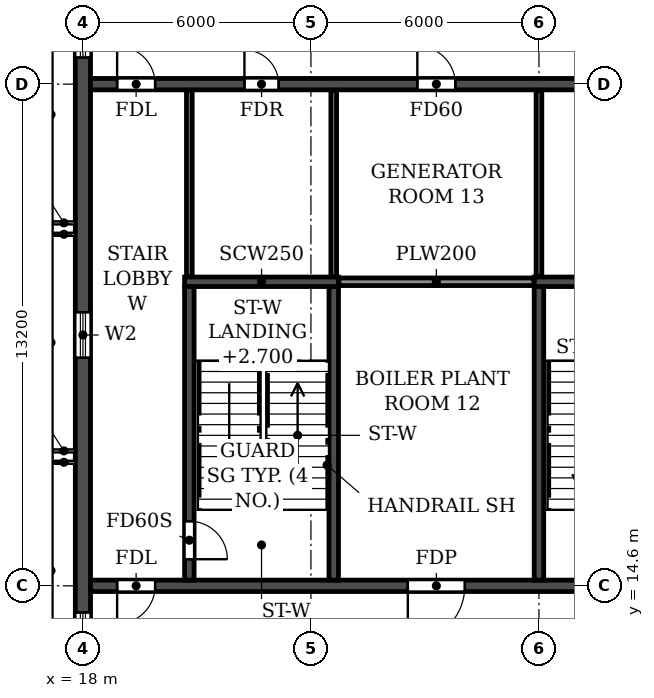
"""IFC4 building model, lengths in metres.
Left out: names, types, materials, properties, quantities, classifications, styles, units other than length and angle.
Written with IfcOpenShell. Run it as: python <this file> out.ifc"""

import sys

from ifc_helpers import new_model, si_unit, direction, frame, frame_2d, origin, place, context, subcontext, project, spatial, rectangle, extrude, element, fill, save


model = new_model("IFC4")
c1 = context("Model", 3, precision=1e-05, world=origin(), true_north=direction((0.0, 1.0)))
c2 = subcontext(c1, "Body", "Model", "MODEL_VIEW")
j1 = project(units=[si_unit("LENGTHUNIT", "METRE"), si_unit("PLANEANGLEUNIT", "RADIAN")], contexts=[c1])
p1 = place(None, origin())
s1 = spatial("IfcSite", under=j1, at=p1, CompositionType="ELEMENT")
p2 = place(p1, origin())
s2 = spatial("IfcBuilding", under=s1, at=p2, CompositionType="ELEMENT")
p3 = place(p2, frame((0.0, 0.0, 267.0)))
s3 = spatial("IfcBuildingStorey", under=s2, at=p3, CompositionType="ELEMENT", Elevation=267.0)
p4 = place(p3, frame((18.0, 4.683, 0.0), z_axis=(0.0, 0.0, 1.0), x_axis=(0.0, 1.0, 0.0)))
e1 = element("IfcWall", 1, at=p4, inside=s3, PredefinedType="SHEAR", context=c2, shape_type="SweptSolid", body=[
    extrude(rectangle(XDim=31.834, YDim=0.4, at=frame_2d((15.917, 0.0))), origin(), (0.0, 0.0, 1.0), 5.15),
])
p5 = place(p4, frame((23.817, 0.0, 0.9)))
e2 = element("IfcOpeningElement", 2, at=p5, cuts=e1, PredefinedType="OPENING", context=c2, shape_type="SweptSolid", body=[
    extrude(rectangle(XDim=1.2, YDim=1.5, at=frame_2d((0.6, 0.75))), frame((0.0, 0.21, 0.0), z_axis=(0.0, -1.0, 0.0), x_axis=(1.0, 0.0, 0.0)), (0.0, 0.0, 1.0), 0.42),
])
p6 = place(p4, frame((8.017, 0.0, 0.9)))
e3 = element("IfcOpeningElement", 3, at=p6, cuts=e1, PredefinedType="OPENING", context=c2, shape_type="SweptSolid", body=[
    extrude(rectangle(XDim=1.2, YDim=1.5, at=frame_2d((0.6, 0.75))), frame((0.0, 0.21, 0.0), z_axis=(0.0, -1.0, 0.0), x_axis=(1.0, 0.0, 0.0)), (0.0, 0.0, 1.0), 0.42),
])
p7 = place(p4, frame((15.917, 0.0, 0.9)))
e4 = element("IfcOpeningElement", 4, at=p7, cuts=e1, PredefinedType="OPENING", context=c2, shape_type="SweptSolid", body=[
    extrude(rectangle(XDim=1.2, YDim=1.5, at=frame_2d((0.6, 0.75))), frame((0.0, 0.21, 0.0), z_axis=(0.0, -1.0, 0.0), x_axis=(1.0, 0.0, 0.0)), (0.0, 0.0, 1.0), 0.42),
])
p8 = place(p3, frame((18.2, 14.6, 0.0), z_axis=(0.0, 0.0, 1.0), x_axis=(1.0, 0.0, 0.0)))
e5 = element("IfcWall", 5, at=p8, inside=s3, PredefinedType="SOLIDWALL", context=c2, shape_type="SweptSolid", body=[
    extrude(rectangle(XDim=65.6, YDim=0.3, at=frame_2d((32.8, 0.0))), origin(), (0.0, 0.0, 1.0), 5.15),
])
p9 = place(p8, frame((0.7, 0.0, 0.0)))
e6 = element("IfcOpeningElement", 6, at=p9, cuts=e5, PredefinedType="OPENING", context=c2, shape_type="SweptSolid", body=[
    extrude(rectangle(XDim=1.0, YDim=2.1, at=frame_2d((0.5, 1.05))), frame((0.0, 0.16, 0.0), z_axis=(0.0, -1.0, 0.0), x_axis=(1.0, 0.0, 0.0)), (0.0, 0.0, 1.0), 0.32),
])
p10 = place(p8, frame((8.35, 0.0, 0.0)))
e7 = element("IfcOpeningElement", 7, at=p10, cuts=e5, PredefinedType="OPENING", context=c2, shape_type="SweptSolid", body=[
    extrude(rectangle(XDim=1.5, YDim=2.1, at=frame_2d((0.75, 1.05))), frame((0.0, 0.16, 0.0), z_axis=(0.0, -1.0, 0.0), x_axis=(1.0, 0.0, 0.0)), (0.0, 0.0, 1.0), 0.32),
])
p11 = place(p8, frame((13.2, 0.0, 0.0)))
e8 = element("IfcOpeningElement", 8, at=p11, cuts=e5, PredefinedType="OPENING", context=c2, shape_type="SweptSolid", body=[
    extrude(rectangle(XDim=1.0, YDim=2.1, at=frame_2d((0.5, 1.05))), frame((0.0, 0.16, 0.0), z_axis=(0.0, -1.0, 0.0), x_axis=(1.0, 0.0, 0.0)), (0.0, 0.0, 1.0), 0.32),
])
p12 = place(p8, frame((27.1, 0.0, 0.0)))
e9 = element("IfcOpeningElement", 9, at=p12, cuts=e5, PredefinedType="OPENING", context=c2, shape_type="SweptSolid", body=[
    extrude(rectangle(XDim=1.0, YDim=2.1, at=frame_2d((0.5, 1.05))), frame((0.0, 0.16, 0.0), z_axis=(0.0, -1.0, 0.0), x_axis=(1.0, 0.0, 0.0)), (0.0, 0.0, 1.0), 0.32),
])
p13 = place(p8, frame((32.3, 0.0, 0.0)))
e10 = element("IfcOpeningElement", 10, at=p13, cuts=e5, PredefinedType="OPENING", context=c2, shape_type="SweptSolid", body=[
    extrude(rectangle(XDim=1.0, YDim=2.1, at=frame_2d((0.5, 1.05))), frame((0.0, 0.16, 0.0), z_axis=(0.0, -1.0, 0.0), x_axis=(1.0, 0.0, 0.0)), (0.0, 0.0, 1.0), 0.32),
])
p14 = place(p8, frame((34.9, 0.0, 0.0)))
e11 = element("IfcOpeningElement", 11, at=p14, cuts=e5, PredefinedType="OPENING", context=c2, shape_type="SweptSolid", body=[
    extrude(rectangle(XDim=1.0, YDim=2.1, at=frame_2d((0.5, 1.05))), frame((0.0, 0.16, 0.0), z_axis=(0.0, -1.0, 0.0), x_axis=(1.0, 0.0, 0.0)), (0.0, 0.0, 1.0), 0.32),
])
p15 = place(p8, frame((38.8, 0.0, 0.0)))
e12 = element("IfcOpeningElement", 12, at=p15, cuts=e5, PredefinedType="OPENING", context=c2, shape_type="SweptSolid", body=[
    extrude(rectangle(XDim=1.0, YDim=2.1, at=frame_2d((0.5, 1.05))), frame((0.0, 0.16, 0.0), z_axis=(0.0, -1.0, 0.0), x_axis=(1.0, 0.0, 0.0)), (0.0, 0.0, 1.0), 0.32),
])
p16 = place(p8, frame((51.4, 0.0, 0.0)))
e13 = element("IfcOpeningElement", 13, at=p16, cuts=e5, PredefinedType="OPENING", context=c2, shape_type="SweptSolid", body=[
    extrude(rectangle(XDim=1.0, YDim=2.1, at=frame_2d((0.5, 1.05))), frame((0.0, 0.16, 0.0), z_axis=(0.0, -1.0, 0.0), x_axis=(1.0, 0.0, 0.0)), (0.0, 0.0, 1.0), 0.32),
])
p17 = place(p8, frame((55.75, 0.0, 0.0)))
e14 = element("IfcOpeningElement", 14, at=p17, cuts=e5, PredefinedType="OPENING", context=c2, shape_type="SweptSolid", body=[
    extrude(rectangle(XDim=1.5, YDim=2.1, at=frame_2d((0.75, 1.05))), frame((0.0, 0.16, 0.0), z_axis=(0.0, -1.0, 0.0), x_axis=(1.0, 0.0, 0.0)), (0.0, 0.0, 1.0), 0.32),
])
p18 = place(p8, frame((63.9, 0.0, 0.0)))
e15 = element("IfcOpeningElement", 15, at=p18, cuts=e5, PredefinedType="OPENING", context=c2, shape_type="SweptSolid", body=[
    extrude(rectangle(XDim=1.0, YDim=2.1, at=frame_2d((0.5, 1.05))), frame((0.0, 0.16, 0.0), z_axis=(0.0, -1.0, 0.0), x_axis=(1.0, 0.0, 0.0)), (0.0, 0.0, 1.0), 0.32),
])
p19 = place(p3, frame((18.2, 27.8, 0.0), z_axis=(0.0, 0.0, 1.0), x_axis=(1.0, 0.0, 0.0)))
e16 = element("IfcWall", 16, at=p19, inside=s3, PredefinedType="SOLIDWALL", context=c2, shape_type="SweptSolid", body=[
    extrude(rectangle(XDim=65.6, YDim=0.3, at=frame_2d((32.8, 0.0))), origin(), (0.0, 0.0, 1.0), 5.15),
])
p20 = place(p19, frame((0.7, 0.0, 0.0)))
e17 = element("IfcOpeningElement", 17, at=p20, cuts=e16, PredefinedType="OPENING", context=c2, shape_type="SweptSolid", body=[
    extrude(rectangle(XDim=1.0, YDim=2.1, at=frame_2d((0.5, 1.05))), frame((0.0, 0.16, 0.0), z_axis=(0.0, -1.0, 0.0), x_axis=(1.0, 0.0, 0.0)), (0.0, 0.0, 1.0), 0.32),
])
p21 = place(p19, frame((4.05, 0.0, 0.0)))
e18 = element("IfcOpeningElement", 18, at=p21, cuts=e16, PredefinedType="OPENING", context=c2, shape_type="SweptSolid", body=[
    extrude(rectangle(XDim=0.9, YDim=2.1, at=frame_2d((0.45, 1.05))), frame((0.0, 0.16, 0.0), z_axis=(0.0, -1.0, 0.0), x_axis=(1.0, 0.0, 0.0)), (0.0, 0.0, 1.0), 0.32),
])
p22 = place(p19, frame((8.6, 0.0, 0.0)))
e19 = element("IfcOpeningElement", 19, at=p22, cuts=e16, PredefinedType="OPENING", context=c2, shape_type="SweptSolid", body=[
    extrude(rectangle(XDim=1.0, YDim=2.1, at=frame_2d((0.5, 1.05))), frame((0.0, 0.16, 0.0), z_axis=(0.0, -1.0, 0.0), x_axis=(1.0, 0.0, 0.0)), (0.0, 0.0, 1.0), 0.32),
])
p23 = place(p19, frame((13.25, 0.0, 0.0)))
e20 = element("IfcOpeningElement", 20, at=p23, cuts=e16, PredefinedType="OPENING", context=c2, shape_type="SweptSolid", body=[
    extrude(rectangle(XDim=0.9, YDim=2.1, at=frame_2d((0.45, 1.05))), frame((0.0, 0.16, 0.0), z_axis=(0.0, -1.0, 0.0), x_axis=(1.0, 0.0, 0.0)), (0.0, 0.0, 1.0), 0.32),
])
p24 = place(p19, frame((17.7, 0.0, 0.0)))
e21 = element("IfcOpeningElement", 21, at=p24, cuts=e16, PredefinedType="OPENING", context=c2, shape_type="SweptSolid", body=[
    extrude(rectangle(XDim=1.0, YDim=2.1, at=frame_2d((0.5, 1.05))), frame((0.0, 0.16, 0.0), z_axis=(0.0, -1.0, 0.0), x_axis=(1.0, 0.0, 0.0)), (0.0, 0.0, 1.0), 0.32),
])
p25 = place(p19, frame((22.9, 0.0, 0.0)))
e22 = element("IfcOpeningElement", 22, at=p25, cuts=e16, PredefinedType="OPENING", context=c2, shape_type="SweptSolid", body=[
    extrude(rectangle(XDim=1.0, YDim=2.1, at=frame_2d((0.5, 1.05))), frame((0.0, 0.16, 0.0), z_axis=(0.0, -1.0, 0.0), x_axis=(1.0, 0.0, 0.0)), (0.0, 0.0, 1.0), 0.32),
])
p26 = place(p19, frame((29.4, 0.0, 0.0)))
e23 = element("IfcOpeningElement", 23, at=p26, cuts=e16, PredefinedType="OPENING", context=c2, shape_type="SweptSolid", body=[
    extrude(rectangle(XDim=1.0, YDim=2.1, at=frame_2d((0.5, 1.05))), frame((0.0, 0.16, 0.0), z_axis=(0.0, -1.0, 0.0), x_axis=(1.0, 0.0, 0.0)), (0.0, 0.0, 1.0), 0.32),
])
p27 = place(p19, frame((32.3, 0.0, 0.0)))
e24 = element("IfcOpeningElement", 24, at=p27, cuts=e16, PredefinedType="OPENING", context=c2, shape_type="SweptSolid", body=[
    extrude(rectangle(XDim=1.0, YDim=2.1, at=frame_2d((0.5, 1.05))), frame((0.0, 0.16, 0.0), z_axis=(0.0, -1.0, 0.0), x_axis=(1.0, 0.0, 0.0)), (0.0, 0.0, 1.0), 0.32),
])
p28 = place(p19, frame((35.2, 0.0, 0.0)))
e25 = element("IfcOpeningElement", 25, at=p28, cuts=e16, PredefinedType="OPENING", context=c2, shape_type="SweptSolid", body=[
    extrude(rectangle(XDim=1.0, YDim=2.1, at=frame_2d((0.5, 1.05))), frame((0.0, 0.16, 0.0), z_axis=(0.0, -1.0, 0.0), x_axis=(1.0, 0.0, 0.0)), (0.0, 0.0, 1.0), 0.32),
])
p29 = place(p19, frame((37.8, 0.0, 0.0)))
e26 = element("IfcOpeningElement", 26, at=p29, cuts=e16, PredefinedType="OPENING", context=c2, shape_type="SweptSolid", body=[
    extrude(rectangle(XDim=1.0, YDim=2.1, at=frame_2d((0.5, 1.05))), frame((0.0, 0.16, 0.0), z_axis=(0.0, -1.0, 0.0), x_axis=(1.0, 0.0, 0.0)), (0.0, 0.0, 1.0), 0.32),
])
p30 = place(p19, frame((40.4, 0.0, 0.0)))
e27 = element("IfcOpeningElement", 27, at=p30, cuts=e16, PredefinedType="OPENING", context=c2, shape_type="SweptSolid", body=[
    extrude(rectangle(XDim=1.0, YDim=2.1, at=frame_2d((0.5, 1.05))), frame((0.0, 0.16, 0.0), z_axis=(0.0, -1.0, 0.0), x_axis=(1.0, 0.0, 0.0)), (0.0, 0.0, 1.0), 0.32),
])
p31 = place(p19, frame((43.0, 0.0, 0.0)))
e28 = element("IfcOpeningElement", 28, at=p31, cuts=e16, PredefinedType="OPENING", context=c2, shape_type="SweptSolid", body=[
    extrude(rectangle(XDim=1.0, YDim=2.1, at=frame_2d((0.5, 1.05))), frame((0.0, 0.16, 0.0), z_axis=(0.0, -1.0, 0.0), x_axis=(1.0, 0.0, 0.0)), (0.0, 0.0, 1.0), 0.32),
])
p32 = place(p19, frame((46.9, 0.0, 0.0)))
e29 = element("IfcOpeningElement", 29, at=p32, cuts=e16, PredefinedType="OPENING", context=c2, shape_type="SweptSolid", body=[
    extrude(rectangle(XDim=1.0, YDim=2.1, at=frame_2d((0.5, 1.05))), frame((0.0, 0.16, 0.0), z_axis=(0.0, -1.0, 0.0), x_axis=(1.0, 0.0, 0.0)), (0.0, 0.0, 1.0), 0.32),
])
p33 = place(p19, frame((51.45, 0.0, 0.0)))
e30 = element("IfcOpeningElement", 30, at=p33, cuts=e16, PredefinedType="OPENING", context=c2, shape_type="SweptSolid", body=[
    extrude(rectangle(XDim=0.9, YDim=2.1, at=frame_2d((0.45, 1.05))), frame((0.0, 0.16, 0.0), z_axis=(0.0, -1.0, 0.0), x_axis=(1.0, 0.0, 0.0)), (0.0, 0.0, 1.0), 0.32),
])
p34 = place(p19, frame((56.0, 0.0, 0.0)))
e31 = element("IfcOpeningElement", 31, at=p34, cuts=e16, PredefinedType="OPENING", context=c2, shape_type="SweptSolid", body=[
    extrude(rectangle(XDim=1.0, YDim=2.1, at=frame_2d((0.5, 1.05))), frame((0.0, 0.16, 0.0), z_axis=(0.0, -1.0, 0.0), x_axis=(1.0, 0.0, 0.0)), (0.0, 0.0, 1.0), 0.32),
])
p35 = place(p19, frame((60.65, 0.0, 0.0)))
e32 = element("IfcOpeningElement", 32, at=p35, cuts=e16, PredefinedType="OPENING", context=c2, shape_type="SweptSolid", body=[
    extrude(rectangle(XDim=0.9, YDim=2.1, at=frame_2d((0.45, 1.05))), frame((0.0, 0.16, 0.0), z_axis=(0.0, -1.0, 0.0), x_axis=(1.0, 0.0, 0.0)), (0.0, 0.0, 1.0), 0.32),
])
p36 = place(p19, frame((63.9, 0.0, 0.0)))
e33 = element("IfcOpeningElement", 33, at=p36, cuts=e16, PredefinedType="OPENING", context=c2, shape_type="SweptSolid", body=[
    extrude(rectangle(XDim=1.0, YDim=2.1, at=frame_2d((0.5, 1.05))), frame((0.0, 0.16, 0.0), z_axis=(0.0, -1.0, 0.0), x_axis=(1.0, 0.0, 0.0)), (0.0, 0.0, 1.0), 0.32),
])
p37 = place(p3, frame((30.0, 14.75, 0.0), z_axis=(0.0, 0.0, 1.0), x_axis=(0.0, 1.0, 0.0)))
e34 = element("IfcWall", 34, at=p37, inside=s3, PredefinedType="SOLIDWALL", context=c2, shape_type="SweptSolid", body=[
    extrude(rectangle(XDim=7.725, YDim=0.25, at=frame_2d((3.863, 0.0))), origin(), (0.0, 0.0, 1.0), 5.15),
])
p38 = place(p3, frame((29.875, 22.6, 0.0), z_axis=(0.0, 0.0, 1.0), x_axis=(1.0, 0.0, 0.0)))
e35 = element("IfcWall", 35, at=p38, inside=s3, PredefinedType="SOLIDWALL", context=c2, shape_type="SweptSolid", body=[
    extrude(rectangle(XDim=4.05, YDim=0.25, at=frame_2d((2.025, 0.0))), origin(), (0.0, 0.0, 1.0), 5.15),
])
p39 = place(p3, frame((20.8, 14.75, 0.0), z_axis=(0.0, 0.0, 1.0), x_axis=(0.0, 1.0, 0.0)))
e36 = element("IfcWall", 36, at=p39, inside=s3, PredefinedType="SOLIDWALL", context=c2, shape_type="SweptSolid", body=[
    extrude(rectangle(XDim=7.725, YDim=0.25, at=frame_2d((3.863, 0.0))), origin(), (0.0, 0.0, 1.0), 5.15),
])
p40 = place(p39, frame((0.55, 0.0, 0.0)))
e37 = element("IfcOpeningElement", 37, at=p40, cuts=e36, PredefinedType="OPENING", context=c2, shape_type="SweptSolid", body=[
    extrude(rectangle(XDim=1.0, YDim=2.1, at=frame_2d((0.5, 1.05))), frame((0.0, 0.135, 0.0), z_axis=(0.0, -1.0, 0.0), x_axis=(1.0, 0.0, 0.0)), (0.0, 0.0, 1.0), 0.27),
])
p41 = place(p3, frame((24.6, 14.75, 0.0), z_axis=(0.0, 0.0, 1.0), x_axis=(0.0, 1.0, 0.0)))
e38 = element("IfcWall", 38, at=p41, inside=s3, PredefinedType="SOLIDWALL", context=c2, shape_type="SweptSolid", body=[
    extrude(rectangle(XDim=7.725, YDim=0.25, at=frame_2d((3.863, 0.0))), origin(), (0.0, 0.0, 1.0), 5.15),
])
p42 = place(p3, frame((20.675, 22.6, 0.0), z_axis=(0.0, 0.0, 1.0), x_axis=(1.0, 0.0, 0.0)))
e39 = element("IfcWall", 39, at=p42, inside=s3, PredefinedType="SOLIDWALL", context=c2, shape_type="SweptSolid", body=[
    extrude(rectangle(XDim=4.05, YDim=0.25, at=frame_2d((2.025, 0.0))), origin(), (0.0, 0.0, 1.0), 5.15),
])
p43 = place(p3, frame((24.735, 22.6, 0.0), z_axis=(0.0, 0.0, 1.0), x_axis=(1.0, 0.0, 0.0)))
e40 = element("IfcWall", 40, at=p43, inside=s3, PredefinedType="PARTITIONING", context=c2, shape_type="SweptSolid", body=[
    extrude(rectangle(XDim=5.13, YDim=0.2, at=frame_2d((2.565, 0.0))), origin(), (0.0, 0.0, 1.0), 5.15),
])
for number, where, z_axis, x_axis in (
    (41, (20.8, 22.735, 0.0), (0.0, 0.0, 1.0), (0.0, 1.0, 0.0)),
    (42, (24.6, 22.735, 0.0), (0.0, 0.0, 1.0), (0.0, 1.0, 0.0)),
    (43, (30.0, 22.735, 0.0), (0.0, 0.0, 1.0), (0.0, 1.0, 0.0)),
):
    element("IfcWall", number, at=place(p3, frame(where, z_axis=z_axis, x_axis=x_axis)), inside=s3, PredefinedType="PARTITIONING", context=c2, shape_type="SweptSolid", body=[
        extrude(rectangle(XDim=4.905, YDim=0.15, at=frame_2d((2.452, 0.0))), origin(), (0.0, 0.0, 1.0), 5.15),
    ])
p44 = place(p5, origin())
e44 = element("IfcWindow", 44, at=p44, inside=s3, PartitioningType="SINGLE_PANEL", PredefinedType="WINDOW", context=c2, shape_type="SweptSolid", body=[
    extrude(rectangle(XDim=1.2, YDim=1.5, at=frame_2d((0.6, 0.75))), frame((0.0, 0.03, 0.0), z_axis=(0.0, -1.0, 0.0), x_axis=(1.0, 0.0, 0.0)), (0.0, 0.0, 1.0), 0.06),
])
fill(e2, e44)
p45 = place(p6, origin())
e45 = element("IfcWindow", 45, at=p45, inside=s3, PartitioningType="SINGLE_PANEL", PredefinedType="WINDOW", context=c2, shape_type="SweptSolid", body=[
    extrude(rectangle(XDim=1.2, YDim=1.5, at=frame_2d((0.6, 0.75))), frame((0.0, 0.03, 0.0), z_axis=(0.0, -1.0, 0.0), x_axis=(1.0, 0.0, 0.0)), (0.0, 0.0, 1.0), 0.06),
])
fill(e3, e45)
p46 = place(p7, origin())
e46 = element("IfcWindow", 46, at=p46, inside=s3, PartitioningType="SINGLE_PANEL", PredefinedType="WINDOW", context=c2, shape_type="SweptSolid", body=[
    extrude(rectangle(XDim=1.2, YDim=1.5, at=frame_2d((0.6, 0.75))), frame((0.0, 0.03, 0.0), z_axis=(0.0, -1.0, 0.0), x_axis=(1.0, 0.0, 0.0)), (0.0, 0.0, 1.0), 0.06),
])
fill(e4, e46)
p47 = place(p20, origin())
e47 = element("IfcDoor", 47, at=p47, inside=s3, OperationType="SINGLE_SWING_LEFT", PredefinedType="DOOR", context=c2, shape_type="SweptSolid", body=[
    extrude(rectangle(XDim=1.0, YDim=2.1, at=frame_2d((0.5, 1.05))), frame((0.0, 0.025, 0.0), z_axis=(0.0, -1.0, 0.0), x_axis=(1.0, 0.0, 0.0)), (0.0, 0.0, 1.0), 0.05),
])
fill(e17, e47)
p48 = place(p21, origin())
e48 = element("IfcDoor", 48, at=p48, inside=s3, OperationType="SINGLE_SWING_LEFT", PredefinedType="DOOR", context=c2, shape_type="SweptSolid", body=[
    extrude(rectangle(XDim=0.9, YDim=2.1, at=frame_2d((0.45, 1.05))), frame((0.0, 0.025, 0.0), z_axis=(0.0, -1.0, 0.0), x_axis=(1.0, 0.0, 0.0)), (0.0, 0.0, 1.0), 0.05),
])
fill(e18, e48)
p49 = place(p22, origin())
e49 = element("IfcDoor", 49, at=p49, inside=s3, OperationType="SINGLE_SWING_LEFT", PredefinedType="DOOR", context=c2, shape_type="SweptSolid", body=[
    extrude(rectangle(XDim=1.0, YDim=2.1, at=frame_2d((0.5, 1.05))), frame((0.0, 0.025, 0.0), z_axis=(0.0, -1.0, 0.0), x_axis=(1.0, 0.0, 0.0)), (0.0, 0.0, 1.0), 0.05),
])
fill(e19, e49)
p50 = place(p9, frame((1.0, 0.0, 0.0), z_axis=(0.0, 0.0, 1.0), x_axis=(-1.0, 0.0, 0.0)))
e50 = element("IfcDoor", 50, at=p50, inside=s3, OperationType="SINGLE_SWING_RIGHT", PredefinedType="DOOR", context=c2, shape_type="SweptSolid", body=[
    extrude(rectangle(XDim=1.0, YDim=2.1, at=frame_2d((0.5, 1.05))), frame((0.0, 0.025, 0.0), z_axis=(0.0, -1.0, 0.0), x_axis=(1.0, 0.0, 0.0)), (0.0, 0.0, 1.0), 0.05),
])
fill(e6, e50)
p51 = place(p10, frame((1.5, 0.0, 0.0), z_axis=(0.0, 0.0, 1.0), x_axis=(-1.0, 0.0, 0.0)))
e51 = element("IfcDoor", 51, at=p51, inside=s3, OperationType="DOUBLE_DOOR_SINGLE_SWING", PredefinedType="DOOR", context=c2, shape_type="SweptSolid", body=[
    extrude(rectangle(XDim=1.5, YDim=2.1, at=frame_2d((0.75, 1.05))), frame((0.0, 0.025, 0.0), z_axis=(0.0, -1.0, 0.0), x_axis=(1.0, 0.0, 0.0)), (0.0, 0.0, 1.0), 0.05),
])
fill(e7, e51)
p52 = place(p40, frame((1.0, 0.0, 0.0), z_axis=(0.0, 0.0, 1.0), x_axis=(-1.0, 0.0, 0.0)))
e52 = element("IfcDoor", 52, at=p52, inside=s3, OperationType="SINGLE_SWING_RIGHT", PredefinedType="DOOR", context=c2, shape_type="SweptSolid", body=[
    extrude(rectangle(XDim=1.0, YDim=2.1, at=frame_2d((0.5, 1.05))), frame((0.0, 0.025, 0.0), z_axis=(0.0, -1.0, 0.0), x_axis=(1.0, 0.0, 0.0)), (0.0, 0.0, 1.0), 0.05),
])
fill(e37, e52)
save(model, sys.argv[1])
